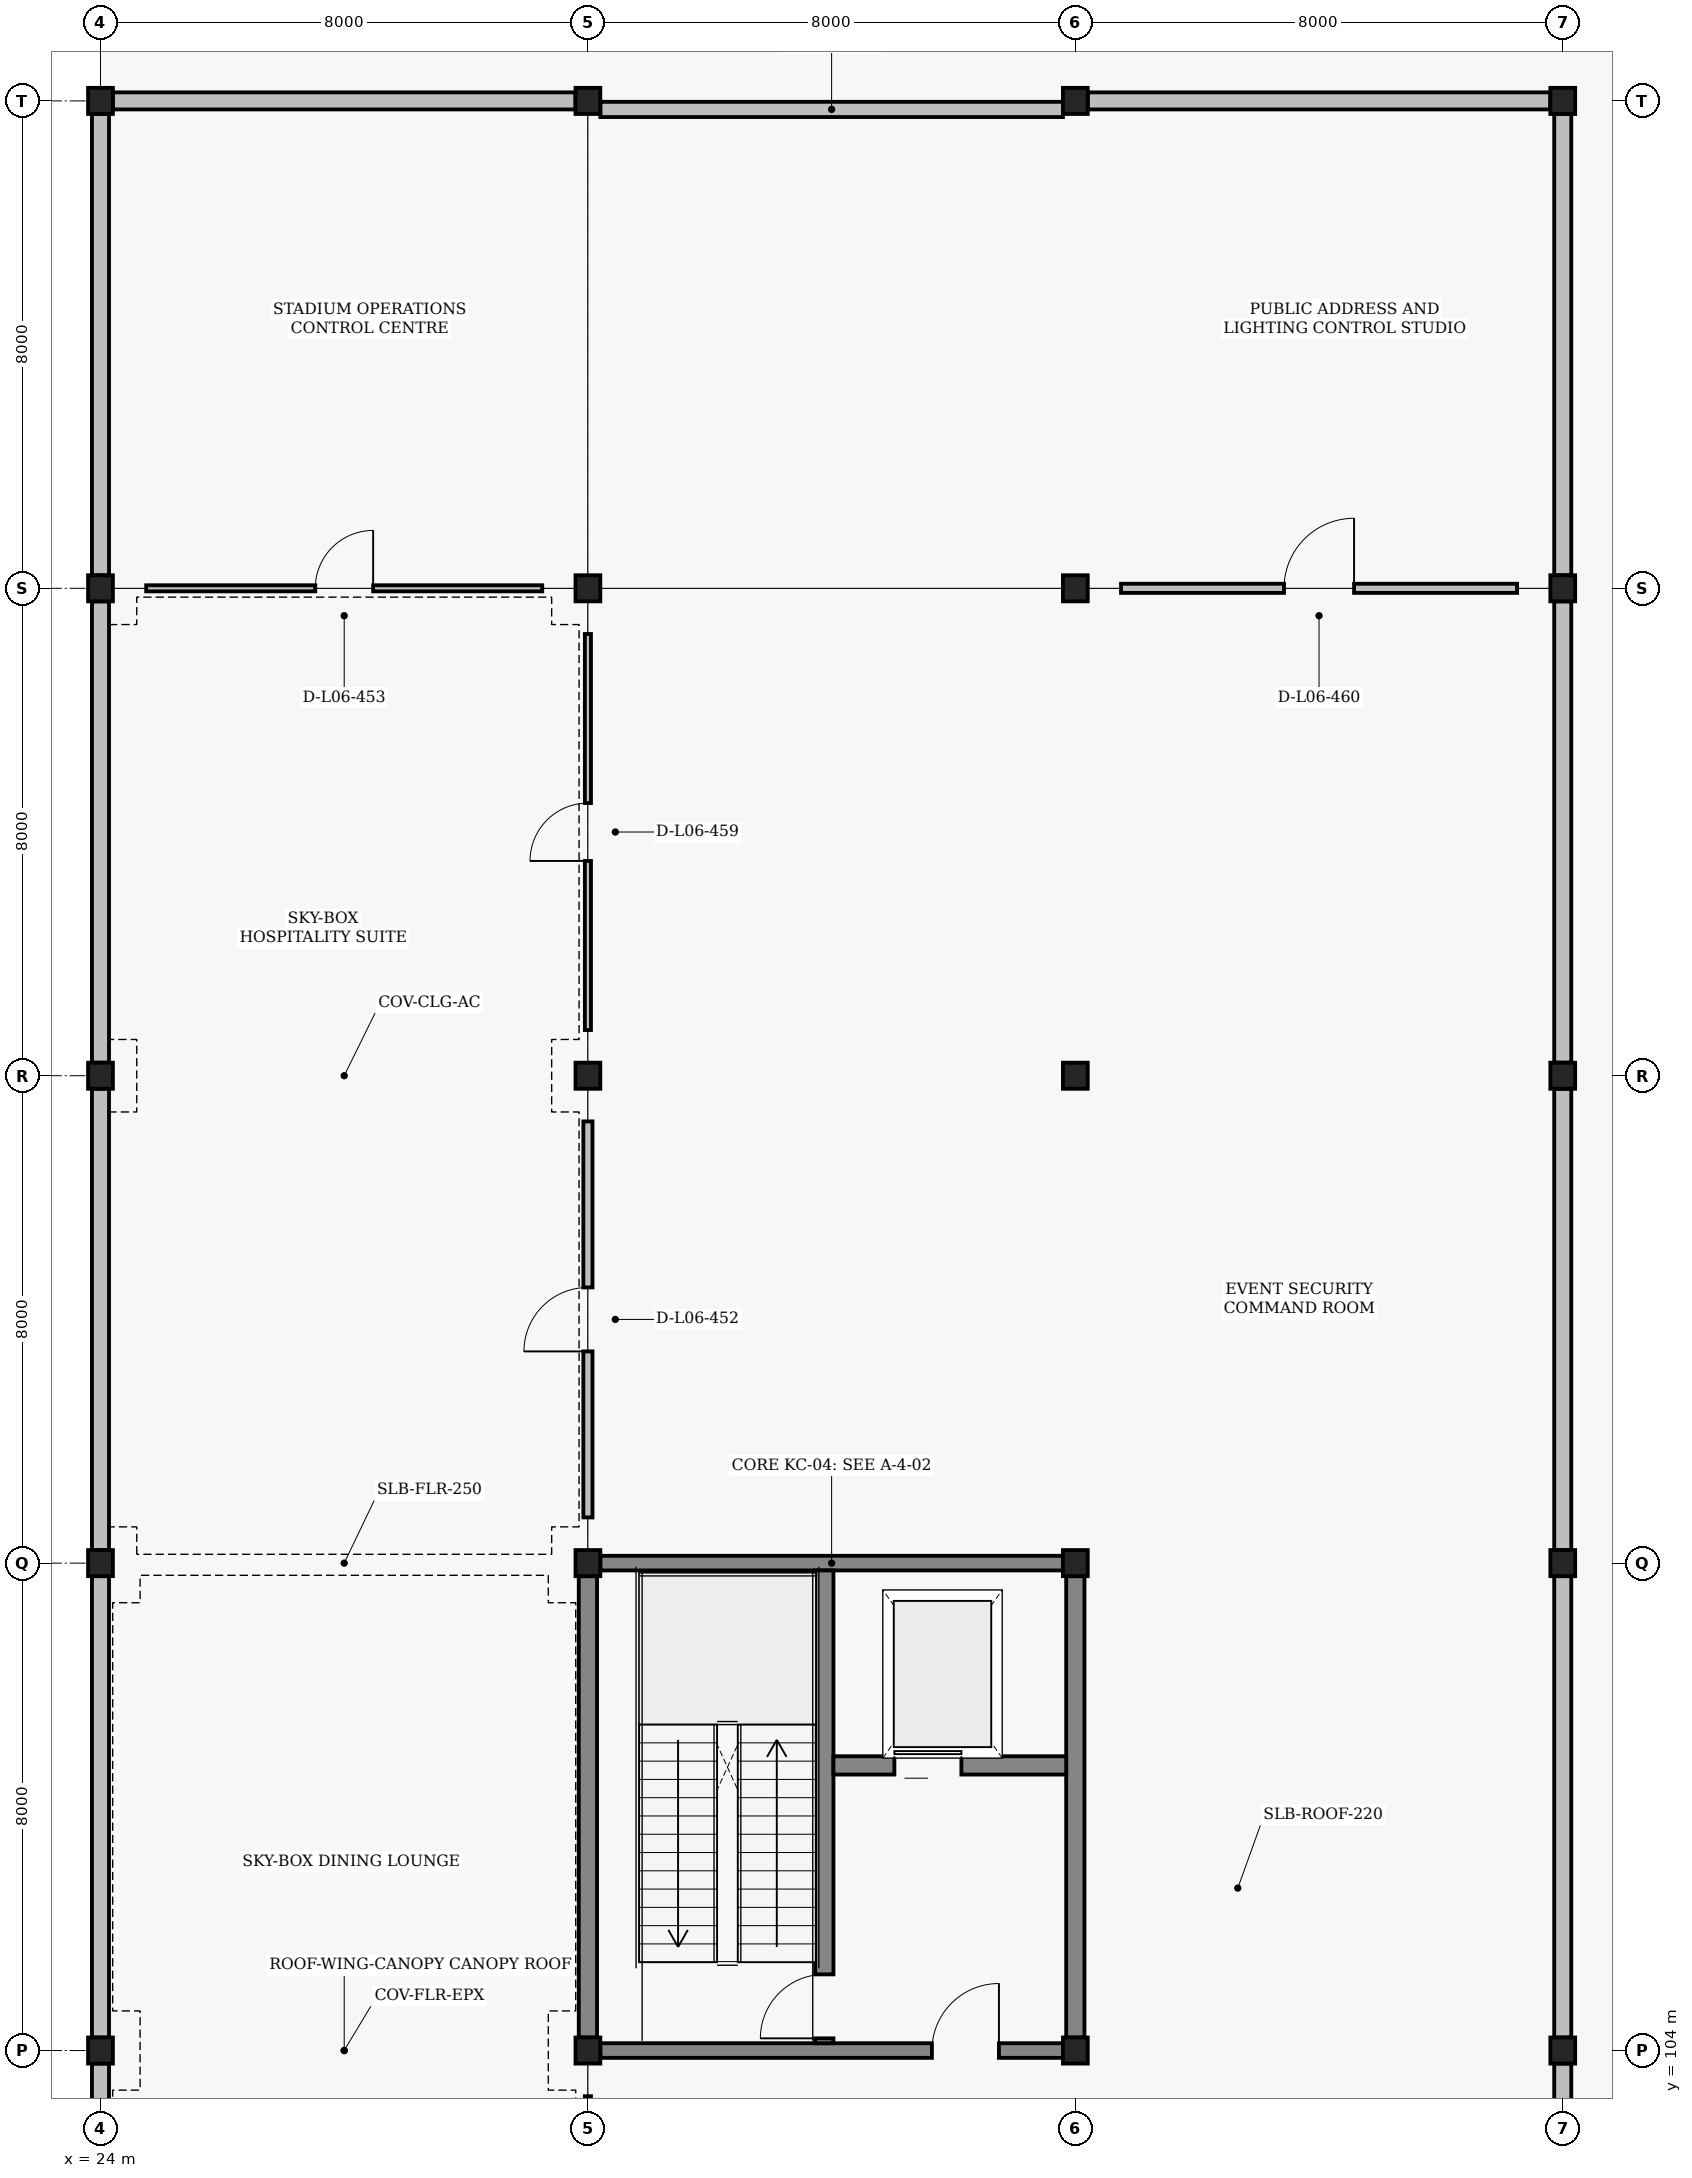
"""IFC4 building model, lengths in metres.
Left out: names, types, materials, properties, quantities, classifications, styles, units other than length and angle.
Written with IfcOpenShell. Run it as: python <this file> out.ifc"""

import sys

from ifc_helpers import new_model, si_unit, direction, frame, frame_2d, origin, origin_2d, place, context, subcontext, project, spatial, rectangle, i_section, extrude, element, fill, save


model = new_model("IFC4")
c1 = context("Model", 3, precision=1e-05, world=origin(), true_north=direction((0.0, 1.0)))
c2 = subcontext(c1, "Body", "Model", "MODEL_VIEW")
j1 = project(units=[si_unit("LENGTHUNIT", "METRE"), si_unit("PLANEANGLEUNIT", "RADIAN")], contexts=[c1])
p1 = place(None, origin())
s1 = spatial("IfcSite", under=j1, at=p1, CompositionType="ELEMENT")
p2 = place(p1, origin())
s2 = spatial("IfcBuilding", under=s1, at=p2, CompositionType="ELEMENT")
p3 = place(p2, frame((0.0, 0.0, 22.8)))
s3 = spatial("IfcBuildingStorey", under=s2, at=p3, CompositionType="ELEMENT", Elevation=22.8)
for number, where, z_axis, x_axis in (
    (1, (24.0, 104.0, 0.0), (0.0, 0.0, 1.0), (1.0, 0.0, 0.0)),
    (2, (24.0, 112.0, 0.0), (0.0, 0.0, 1.0), (1.0, 0.0, 0.0)),
    (3, (24.0, 120.0, 0.0), (0.0, 0.0, 1.0), (1.0, 0.0, 0.0)),
    (4, (24.0, 128.0, 0.0), (0.0, 0.0, 1.0), (1.0, 0.0, 0.0)),
    (5, (24.0, 136.0, 0.0), (0.0, 0.0, 1.0), (1.0, 0.0, 0.0)),
    (6, (32.0, 104.0, 0.0), (0.0, 0.0, 1.0), (1.0, 0.0, 0.0)),
    (7, (32.0, 112.0, 0.0), (0.0, 0.0, 1.0), (1.0, 0.0, 0.0)),
    (8, (32.0, 120.0, 0.0), (0.0, 0.0, 1.0), (1.0, 0.0, 0.0)),
    (9, (32.0, 128.0, 0.0), (0.0, 0.0, 1.0), (1.0, 0.0, 0.0)),
    (10, (32.0, 136.0, 0.0), (0.0, 0.0, 1.0), (1.0, 0.0, 0.0)),
    (11, (40.0, 104.0, 0.0), (0.0, 0.0, 1.0), (1.0, 0.0, 0.0)),
    (12, (40.0, 112.0, 0.0), (0.0, 0.0, 1.0), (1.0, 0.0, 0.0)),
    (13, (40.0, 120.0, 0.0), (0.0, 0.0, 1.0), (1.0, 0.0, 0.0)),
    (14, (40.0, 128.0, 0.0), (0.0, 0.0, 1.0), (1.0, 0.0, 0.0)),
    (15, (40.0, 136.0, 0.0), (0.0, 0.0, 1.0), (1.0, 0.0, 0.0)),
    (16, (48.0, 104.0, 0.0), (0.0, 0.0, 1.0), (1.0, 0.0, 0.0)),
    (17, (48.0, 112.0, 0.0), (0.0, 0.0, 1.0), (1.0, 0.0, 0.0)),
    (18, (48.0, 120.0, 0.0), (0.0, 0.0, 1.0), (1.0, 0.0, 0.0)),
    (19, (48.0, 128.0, 0.0), (0.0, 0.0, 1.0), (1.0, 0.0, 0.0)),
    (20, (48.0, 136.0, 0.0), (0.0, 0.0, 1.0), (1.0, 0.0, 0.0)),
):
    element("IfcColumn", number, at=place(p3, frame(where, z_axis=z_axis, x_axis=x_axis)), inside=s3, PredefinedType="COLUMN", context=c2, shape_type="SweptSolid", body=[
        extrude(i_section(OverallWidth=0.407, OverallDepth=0.428, WebThickness=0.02, FlangeThickness=0.035, at=origin_2d()), origin(), (0.0, 0.0, 1.0), 4.2),
    ])
for number, where, z_axis, x_axis in (
    (21, (24.0, 96.214, 0.0), (0.0, 0.0, 1.0), (0.0, 1.0, 0.0)),
    (22, (24.0, 104.214, 0.0), (0.0, 0.0, 1.0), (0.0, 1.0, 0.0)),
    (23, (24.0, 112.214, 0.0), (0.0, 0.0, 1.0), (0.0, 1.0, 0.0)),
    (24, (24.0, 120.214, 0.0), (0.0, 0.0, 1.0), (0.0, 1.0, 0.0)),
):
    element("IfcWall", number, at=place(p3, frame(where, z_axis=z_axis, x_axis=x_axis)), inside=s3, PredefinedType="SOLIDWALL", context=c2, shape_type="SweptSolid", body=[
        extrude(rectangle(XDim=7.572, YDim=0.28, at=frame_2d((3.786, 0.0))), origin(), (0.0, 0.0, 1.0), 3.34),
    ])
p4 = place(p3, frame((24.204, 136.0, 0.0), z_axis=(0.0, 0.0, 1.0), x_axis=(1.0, 0.0, 0.0)))
e25 = element("IfcWall", 25, at=p4, inside=s3, PredefinedType="SOLIDWALL", context=c2, shape_type="SweptSolid", body=[
    extrude(rectangle(XDim=7.592, YDim=0.28, at=frame_2d((3.796, 0.0))), origin(), (0.0, 0.0, 1.0), 3.35),
])
p5 = place(p3, frame((24.0, 128.214, 0.0), z_axis=(0.0, 0.0, 1.0), x_axis=(0.0, 1.0, 0.0)))
e26 = element("IfcWall", 26, at=p5, inside=s3, PredefinedType="SOLIDWALL", context=c2, shape_type="SweptSolid", body=[
    extrude(rectangle(XDim=7.572, YDim=0.28, at=frame_2d((3.786, 0.0))), origin(), (0.0, 0.0, 1.0), 3.35),
])
for number, where, z_axis, x_axis in (
    (27, (48.0, 96.214, 0.0), (0.0, 0.0, 1.0), (0.0, 1.0, 0.0)),
    (28, (48.0, 104.214, 0.0), (0.0, 0.0, 1.0), (0.0, 1.0, 0.0)),
    (29, (48.0, 112.214, 0.0), (0.0, 0.0, 1.0), (0.0, 1.0, 0.0)),
    (30, (48.0, 120.214, 0.0), (0.0, 0.0, 1.0), (0.0, 1.0, 0.0)),
):
    element("IfcWall", number, at=place(p3, frame(where, z_axis=z_axis, x_axis=x_axis)), inside=s3, PredefinedType="SOLIDWALL", context=c2, shape_type="SweptSolid", body=[
        extrude(rectangle(XDim=7.572, YDim=0.28, at=frame_2d((3.786, 0.0))), origin(), (0.0, 0.0, 1.0), 3.34),
    ])
p6 = place(p3, frame((40.204, 136.0, 0.0), z_axis=(0.0, 0.0, 1.0), x_axis=(1.0, 0.0, 0.0)))
e31 = element("IfcWall", 31, at=p6, inside=s3, PredefinedType="SOLIDWALL", context=c2, shape_type="SweptSolid", body=[
    extrude(rectangle(XDim=7.592, YDim=0.28, at=frame_2d((3.796, 0.0))), origin(), (0.0, 0.0, 1.0), 3.35),
])
p7 = place(p3, frame((48.0, 128.214, 0.0), z_axis=(0.0, 0.0, 1.0), x_axis=(0.0, 1.0, 0.0)))
e32 = element("IfcWall", 32, at=p7, inside=s3, PredefinedType="SOLIDWALL", context=c2, shape_type="SweptSolid", body=[
    extrude(rectangle(XDim=7.572, YDim=0.28, at=frame_2d((3.786, 0.0))), origin(), (0.0, 0.0, 1.0), 3.35),
])
p8 = place(p3, frame((32.204, 135.86, 0.0), z_axis=(0.0, 0.0, 1.0), x_axis=(1.0, 0.0, 0.0)))
e33 = element("IfcWall", 33, at=p8, inside=s3, PredefinedType="PARAPET", context=c2, shape_type="SweptSolid", body=[
    extrude(rectangle(XDim=7.592, YDim=0.25, at=frame_2d((3.796, 0.0))), origin(), (0.0, 0.0, 1.0), 1.2),
])
p9 = place(p3, frame((32.204, 104.0, 0.0), z_axis=(0.0, 0.0, 1.0), x_axis=(1.0, 0.0, 0.0)))
e34 = element("IfcWall", 34, at=p9, inside=s3, PredefinedType="SHEAR", context=c2, shape_type="SweptSolid", body=[
    extrude(rectangle(XDim=7.592, YDim=0.24, at=frame_2d((3.796, 0.0))), origin(), (0.0, 0.0, 1.0), 3.34),
])
p10 = place(p9, frame((5.442, 0.0, 0.0)))
e35 = element("IfcOpeningElement", 35, at=p10, cuts=e34, PredefinedType="OPENING", context=c2, shape_type="SweptSolid", body=[
    extrude(rectangle(XDim=1.1, YDim=2.2, at=frame_2d((0.55, 1.1))), frame((0.0, 0.13, 0.0), z_axis=(0.0, -1.0, 0.0), x_axis=(1.0, 0.0, 0.0)), (0.0, 0.0, 1.0), 0.26),
])
p11 = place(p3, frame((32.204, 112.0, 0.0), z_axis=(0.0, 0.0, 1.0), x_axis=(1.0, 0.0, 0.0)))
e36 = element("IfcWall", 36, at=p11, inside=s3, PredefinedType="SHEAR", context=c2, shape_type="SweptSolid", body=[
    extrude(rectangle(XDim=7.592, YDim=0.24, at=frame_2d((3.796, 0.0))), origin(), (0.0, 0.0, 1.0), 3.34),
])
for number, where, z_axis, x_axis in (
    (37, (32.0, 104.214, 0.0), (0.0, 0.0, 1.0), (0.0, 1.0, 0.0)),
    (38, (40.0, 104.214, 0.0), (0.0, 0.0, 1.0), (0.0, 1.0, 0.0)),
):
    element("IfcWall", number, at=place(p3, frame(where, z_axis=z_axis, x_axis=x_axis)), inside=s3, PredefinedType="SHEAR", context=c2, shape_type="SweptSolid", body=[
        extrude(rectangle(XDim=7.572, YDim=0.3, at=frame_2d((3.786, 0.0))), origin(), (0.0, 0.0, 1.0), 3.34),
    ])
p12 = place(p3, frame((35.88, 104.12, 0.0), z_axis=(0.0, 0.0, 1.0), x_axis=(0.0, 1.0, 0.0)))
e39 = element("IfcWall", 39, at=p12, inside=s3, PredefinedType="SHEAR", context=c2, shape_type="SweptSolid", body=[
    extrude(rectangle(XDim=7.76, YDim=0.3, at=frame_2d((3.88, 0.0))), origin(), (0.0, 0.0, 1.0), 3.44),
])
p13 = place(p12, frame((0.08, 0.0, 0.0)))
e40 = element("IfcOpeningElement", 40, at=p13, cuts=e39, PredefinedType="OPENING", context=c2, shape_type="SweptSolid", body=[
    extrude(rectangle(XDim=1.05, YDim=2.15, at=frame_2d((0.525, 1.075))), frame((0.0, 0.16, 0.0), z_axis=(0.0, -1.0, 0.0), x_axis=(1.0, 0.0, 0.0)), (0.0, 0.0, 1.0), 0.32),
])
p14 = place(p3, frame((36.03, 108.68, 0.0), z_axis=(0.0, 0.0, 1.0), x_axis=(1.0, 0.0, 0.0)))
e41 = element("IfcWall", 41, at=p14, inside=s3, PredefinedType="SHEAR", context=c2, shape_type="SweptSolid", body=[
    extrude(rectangle(XDim=3.82, YDim=0.3, at=frame_2d((1.91, 0.0))), origin(), (0.0, 0.0, 1.0), 3.34),
])
p15 = place(p14, frame((1.0, 0.0, 0.0)))
e42 = element("IfcOpeningElement", 42, at=p15, cuts=e41, PredefinedType="OPENING", context=c2, shape_type="SweptSolid", body=[
    extrude(rectangle(XDim=1.1, YDim=2.15, at=frame_2d((0.55, 1.075))), frame((0.0, 0.16, 0.0), z_axis=(0.0, -1.0, 0.0), x_axis=(1.0, 0.0, 0.0)), (0.0, 0.0, 1.0), 0.32),
])
p16 = place(p3, frame((32.0, 96.75, 0.0), z_axis=(0.0, 0.0, 1.0), x_axis=(0.0, 1.0, 0.0)))
e43 = element("IfcWall", 43, at=p16, inside=s3, PredefinedType="PARTITIONING", context=c2, shape_type="SweptSolid", body=[
    extrude(rectangle(XDim=6.5, YDim=0.1, at=frame_2d((3.25, 0.0))), origin(), (0.0, 0.0, 1.0), 3.34),
])
p17 = place(p16, frame((2.775, 0.0, 0.0)))
e44 = element("IfcOpeningElement", 44, at=p17, cuts=e43, PredefinedType="OPENING", context=c2, shape_type="SweptSolid", body=[
    extrude(rectangle(XDim=0.95, YDim=2.1, at=frame_2d((0.475, 1.05))), frame((0.0, 0.06, 0.0), z_axis=(0.0, -1.0, 0.0), x_axis=(1.0, 0.0, 0.0)), (0.0, 0.0, 1.0), 0.12),
])
p18 = place(p3, frame((32.0, 112.75, 0.0), z_axis=(0.0, 0.0, 1.0), x_axis=(0.0, 1.0, 0.0)))
e45 = element("IfcWall", 45, at=p18, inside=s3, PredefinedType="PARTITIONING", context=c2, shape_type="SweptSolid", body=[
    extrude(rectangle(XDim=6.5, YDim=0.15, at=frame_2d((3.25, 0.0))), origin(), (0.0, 0.0, 1.0), 3.34),
])
p19 = place(p18, frame((2.725, 0.0, 0.0)))
e46 = element("IfcOpeningElement", 46, at=p19, cuts=e45, PredefinedType="OPENING", context=c2, shape_type="SweptSolid", body=[
    extrude(rectangle(XDim=1.05, YDim=2.15, at=frame_2d((0.525, 1.075))), frame((0.0, 0.085, 0.0), z_axis=(0.0, -1.0, 0.0), x_axis=(1.0, 0.0, 0.0)), (0.0, 0.0, 1.0), 0.17),
])
p20 = place(p3, frame((24.75, 128.0, 0.0), z_axis=(0.0, 0.0, 1.0), x_axis=(1.0, 0.0, 0.0)))
e47 = element("IfcWall", 47, at=p20, inside=s3, PredefinedType="PARTITIONING", context=c2, shape_type="SweptSolid", body=[
    extrude(rectangle(XDim=6.5, YDim=0.1, at=frame_2d((3.25, 0.0))), origin(), (0.0, 0.0, 1.0), 3.47),
])
p21 = place(p20, frame((2.775, 0.0, 0.0)))
e48 = element("IfcOpeningElement", 48, at=p21, cuts=e47, PredefinedType="OPENING", context=c2, shape_type="SweptSolid", body=[
    extrude(rectangle(XDim=0.95, YDim=2.1, at=frame_2d((0.475, 1.05))), frame((0.0, 0.06, 0.0), z_axis=(0.0, -1.0, 0.0), x_axis=(1.0, 0.0, 0.0)), (0.0, 0.0, 1.0), 0.12),
])
p22 = place(p3, frame((32.0, 120.75, 0.0), z_axis=(0.0, 0.0, 1.0), x_axis=(0.0, 1.0, 0.0)))
e49 = element("IfcWall", 49, at=p22, inside=s3, PredefinedType="PARTITIONING", context=c2, shape_type="SweptSolid", body=[
    extrude(rectangle(XDim=6.5, YDim=0.1, at=frame_2d((3.25, 0.0))), origin(), (0.0, 0.0, 1.0), 3.37),
])
p23 = place(p22, frame((2.775, 0.0, 0.0)))
e50 = element("IfcOpeningElement", 50, at=p23, cuts=e49, PredefinedType="OPENING", context=c2, shape_type="SweptSolid", body=[
    extrude(rectangle(XDim=0.95, YDim=2.1, at=frame_2d((0.475, 1.05))), frame((0.0, 0.06, 0.0), z_axis=(0.0, -1.0, 0.0), x_axis=(1.0, 0.0, 0.0)), (0.0, 0.0, 1.0), 0.12),
])
p24 = place(p3, frame((40.75, 128.0, 0.0), z_axis=(0.0, 0.0, 1.0), x_axis=(1.0, 0.0, 0.0)))
e51 = element("IfcWall", 51, at=p24, inside=s3, PredefinedType="PARTITIONING", context=c2, shape_type="SweptSolid", body=[
    extrude(rectangle(XDim=6.5, YDim=0.15, at=frame_2d((3.25, 0.0))), origin(), (0.0, 0.0, 1.0), 3.47),
])
p25 = place(p24, frame((2.675, 0.0, 0.0)))
e52 = element("IfcOpeningElement", 52, at=p25, cuts=e51, PredefinedType="OPENING", context=c2, shape_type="SweptSolid", body=[
    extrude(rectangle(XDim=1.15, YDim=2.15, at=frame_2d((0.575, 1.075))), frame((0.0, 0.085, 0.0), z_axis=(0.0, -1.0, 0.0), x_axis=(1.0, 0.0, 0.0)), (0.0, 0.0, 1.0), 0.17),
])
p26 = place(p10, origin())
e53 = element("IfcDoor", 53, at=p26, inside=s3, OperationType="SINGLE_SWING_RIGHT", PredefinedType="DOOR", context=c2, shape_type="SweptSolid", body=[
    extrude(rectangle(XDim=1.1, YDim=2.2, at=frame_2d((0.55, 1.1))), frame((0.0, 0.025, 0.0), z_axis=(0.0, -1.0, 0.0), x_axis=(1.0, 0.0, 0.0)), (0.0, 0.0, 1.0), 0.05),
])
fill(e35, e53)
p27 = place(p13, origin())
e54 = element("IfcDoor", 54, at=p27, inside=s3, OperationType="SINGLE_SWING_LEFT", PredefinedType="DOOR", context=c2, shape_type="SweptSolid", body=[
    extrude(rectangle(XDim=1.05, YDim=2.15, at=frame_2d((0.525, 1.075))), frame((0.0, 0.025, 0.0), z_axis=(0.0, -1.0, 0.0), x_axis=(1.0, 0.0, 0.0)), (0.0, 0.0, 1.0), 0.05),
])
fill(e40, e54)
p28 = place(p15, origin())
e55 = element("IfcDoor", 55, at=p28, inside=s3, OperationType="SLIDING_TO_LEFT", PredefinedType="DOOR", context=c2, shape_type="SweptSolid", body=[
    extrude(rectangle(XDim=1.1, YDim=2.15, at=frame_2d((0.55, 1.075))), frame((0.0, 0.025, 0.0), z_axis=(0.0, -1.0, 0.0), x_axis=(1.0, 0.0, 0.0)), (0.0, 0.0, 1.0), 0.05),
])
fill(e42, e55)
p29 = place(p19, origin())
e56 = element("IfcDoor", 56, at=p29, inside=s3, OperationType="SINGLE_SWING_LEFT", PredefinedType="DOOR", context=c2, shape_type="SweptSolid", body=[
    extrude(rectangle(XDim=1.05, YDim=2.15, at=frame_2d((0.525, 1.075))), frame((0.0, 0.025, 0.0), z_axis=(0.0, -1.0, 0.0), x_axis=(1.0, 0.0, 0.0)), (0.0, 0.0, 1.0), 0.05),
])
fill(e46, e56)
p30 = place(p21, origin())
e57 = element("IfcDoor", 57, at=p30, inside=s3, OperationType="SINGLE_SWING_RIGHT", PredefinedType="DOOR", context=c2, shape_type="SweptSolid", body=[
    extrude(rectangle(XDim=0.95, YDim=2.1, at=frame_2d((0.475, 1.05))), frame((0.0, 0.025, 0.0), z_axis=(0.0, -1.0, 0.0), x_axis=(1.0, 0.0, 0.0)), (0.0, 0.0, 1.0), 0.05),
])
fill(e48, e57)
p31 = place(p23, origin())
e58 = element("IfcDoor", 58, at=p31, inside=s3, OperationType="SINGLE_SWING_LEFT", PredefinedType="DOOR", context=c2, shape_type="SweptSolid", body=[
    extrude(rectangle(XDim=0.95, YDim=2.1, at=frame_2d((0.475, 1.05))), frame((0.0, 0.025, 0.0), z_axis=(0.0, -1.0, 0.0), x_axis=(1.0, 0.0, 0.0)), (0.0, 0.0, 1.0), 0.05),
])
fill(e50, e58)
p32 = place(p25, origin())
e59 = element("IfcDoor", 59, at=p32, inside=s3, OperationType="SINGLE_SWING_RIGHT", PredefinedType="DOOR", context=c2, shape_type="SweptSolid", body=[
    extrude(rectangle(XDim=1.15, YDim=2.15, at=frame_2d((0.575, 1.075))), frame((0.0, 0.025, 0.0), z_axis=(0.0, -1.0, 0.0), x_axis=(1.0, 0.0, 0.0)), (0.0, 0.0, 1.0), 0.05),
])
fill(e52, e59)
save(model, sys.argv[1])
